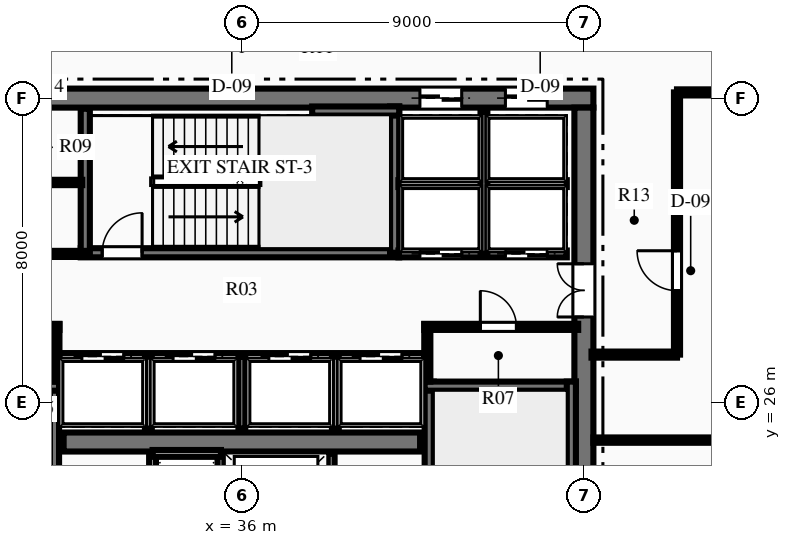
"""IFC4 building model, lengths in metres.
Left out: names, types, materials, properties, quantities, classifications, styles, units other than length and angle.
Written with IfcOpenShell. Run it as: python <this file> out.ifc"""

import sys

from ifc_helpers import new_model, si_unit, direction, frame, frame_2d, origin, place, context, subcontext, project, spatial, rectangle, extrude, element, fill, save


model = new_model("IFC4")
c1 = context("Model", 3, precision=1e-05, world=origin(), true_north=direction((0.0, 1.0)))
c2 = subcontext(c1, "Body", "Model", "MODEL_VIEW")
j1 = project(units=[si_unit("LENGTHUNIT", "METRE"), si_unit("PLANEANGLEUNIT", "RADIAN")], contexts=[c1])
p1 = place(None, origin())
s1 = spatial("IfcSite", under=j1, at=p1, CompositionType="ELEMENT")
p2 = place(p1, origin())
s2 = spatial("IfcBuilding", under=s1, at=p2, CompositionType="ELEMENT")
p3 = place(p2, frame((0.0, 0.0, 213.45)))
s3 = spatial("IfcBuildingStorey", under=s2, at=p3, CompositionType="ELEMENT", Elevation=213.45)
p4 = place(p3, frame((26.75, 34.0, 0.0), z_axis=(0.0, 0.0, 1.0), x_axis=(1.0, 0.0, 0.0)))
e1 = element("IfcWall", 1, at=p4, inside=s3, PredefinedType="SHEAR", context=c2, shape_type="SweptSolid", body=[
    extrude(rectangle(XDim=18.5, YDim=0.5, at=frame_2d((9.25, 0.0))), origin(), (0.0, 0.0, 1.0), 3.75),
])
p5 = place(p4, frame((13.935, 0.0, 0.0)))
e2 = element("IfcOpeningElement", 2, at=p5, cuts=e1, PredefinedType="OPENING", context=c2, shape_type="SweptSolid", body=[
    extrude(rectangle(XDim=1.1, YDim=2.15, at=frame_2d((0.55, 1.075))), frame((0.0, 0.26, 0.0), z_axis=(0.0, -1.0, 0.0), x_axis=(1.0, 0.0, 0.0)), (0.0, 0.0, 1.0), 0.52),
])
p6 = place(p4, frame((16.185, 0.0, 0.0)))
e3 = element("IfcOpeningElement", 3, at=p6, cuts=e1, PredefinedType="OPENING", context=c2, shape_type="SweptSolid", body=[
    extrude(rectangle(XDim=1.1, YDim=2.15, at=frame_2d((0.55, 1.075))), frame((0.0, 0.26, 0.0), z_axis=(0.0, -1.0, 0.0), x_axis=(1.0, 0.0, 0.0)), (0.0, 0.0, 1.0), 0.52),
])
p7 = place(p3, frame((45.0, 18.25, 0.0), z_axis=(0.0, 0.0, 1.0), x_axis=(0.0, 1.0, 0.0)))
e4 = element("IfcWall", 4, at=p7, inside=s3, PredefinedType="SHEAR", context=c2, shape_type="SweptSolid", body=[
    extrude(rectangle(XDim=15.5, YDim=0.5, at=frame_2d((7.75, 0.0))), origin(), (0.0, 0.0, 1.0), 3.75),
])
p8 = place(p7, frame((9.99, 0.0, 0.0)))
e5 = element("IfcOpeningElement", 5, at=p8, cuts=e4, PredefinedType="OPENING", context=c2, shape_type="SweptSolid", body=[
    extrude(rectangle(XDim=1.4, YDim=2.2, at=frame_2d((0.7, 1.1))), frame((0.0, 0.26, 0.0), z_axis=(0.0, -1.0, 0.0), x_axis=(1.0, 0.0, 0.0)), (0.0, 0.0, 1.0), 0.52),
])
p9 = place(p3, frame((31.31, 24.95, 0.0), z_axis=(0.0, 0.0, 1.0), x_axis=(1.0, 0.0, 0.0)))
e6 = element("IfcWall", 6, at=p9, inside=s3, PredefinedType="SHEAR", context=c2, shape_type="SweptSolid", body=[
    extrude(rectangle(XDim=9.38, YDim=0.5, at=frame_2d((4.69, 0.0))), origin(), (0.0, 0.0, 1.0), 3.75),
])
p10 = place(p3, frame((31.07, 18.28, 0.0), z_axis=(0.0, 0.0, 1.0), x_axis=(0.0, 1.0, 0.0)))
e7 = element("IfcWall", 7, at=p10, inside=s3, PredefinedType="SHEAR", context=c2, shape_type="SweptSolid", body=[
    extrude(rectangle(XDim=8.26, YDim=0.24, at=frame_2d((4.13, 0.0))), origin(), (0.0, 0.0, 1.0), 3.75),
])
p11 = place(p10, frame((0.365, 0.0, 0.0)))
e8 = element("IfcOpeningElement", 8, at=p11, cuts=e7, PredefinedType="OPENING", context=c2, shape_type="SweptSolid", body=[
    extrude(rectangle(XDim=1.05, YDim=2.15, at=frame_2d((0.525, 1.075))), frame((0.0, 0.13, 0.0), z_axis=(0.0, -1.0, 0.0), x_axis=(1.0, 0.0, 0.0)), (0.0, 0.0, 1.0), 0.26),
])
p12 = place(p3, frame((27.21, 26.42, 0.0), z_axis=(0.0, 0.0, 1.0), x_axis=(1.0, 0.0, 0.0)))
e9 = element("IfcWall", 9, at=p12, inside=s3, PredefinedType="SHEAR", context=c2, shape_type="SweptSolid", body=[
    extrude(rectangle(XDim=3.98, YDim=0.24, at=frame_2d((1.99, 0.0))), origin(), (0.0, 0.0, 1.0), 3.75),
])
p13 = place(p3, frame((40.93, 18.28, 0.0), z_axis=(0.0, 0.0, 1.0), x_axis=(0.0, 1.0, 0.0)))
e10 = element("IfcWall", 10, at=p13, inside=s3, PredefinedType="SHEAR", context=c2, shape_type="SweptSolid", body=[
    extrude(rectangle(XDim=8.26, YDim=0.24, at=frame_2d((4.13, 0.0))), origin(), (0.0, 0.0, 1.0), 3.75),
])
p14 = place(p13, frame((0.365, 0.0, 0.0)))
e11 = element("IfcOpeningElement", 11, at=p14, cuts=e10, PredefinedType="OPENING", context=c2, shape_type="SweptSolid", body=[
    extrude(rectangle(XDim=1.05, YDim=2.15, at=frame_2d((0.525, 1.075))), frame((0.0, 0.13, 0.0), z_axis=(0.0, -1.0, 0.0), x_axis=(1.0, 0.0, 0.0)), (0.0, 0.0, 1.0), 0.26),
])
p15 = place(p3, frame((40.81, 26.42, 0.0), z_axis=(0.0, 0.0, 1.0), x_axis=(1.0, 0.0, 0.0)))
e12 = element("IfcWall", 12, at=p15, inside=s3, PredefinedType="SHEAR", context=c2, shape_type="SweptSolid", body=[
    extrude(rectangle(XDim=3.98, YDim=0.24, at=frame_2d((1.99, 0.0))), origin(), (0.0, 0.0, 1.0), 3.75),
])
p16 = place(p3, frame((44.67, 18.28, 0.0), z_axis=(0.0, 0.0, 1.0), x_axis=(0.0, 1.0, 0.0)))
e13 = element("IfcWall", 13, at=p16, inside=s3, PredefinedType="SHEAR", context=c2, shape_type="SweptSolid", body=[
    extrude(rectangle(XDim=8.26, YDim=0.24, at=frame_2d((4.13, 0.0))), origin(), (0.0, 0.0, 1.0), 3.75),
])
p17 = place(p3, frame((31.76, 29.93, 0.0), z_axis=(0.0, 0.0, 1.0), x_axis=(1.0, 0.0, 0.0)))
e14 = element("IfcWall", 14, at=p17, inside=s3, PredefinedType="SHEAR", context=c2, shape_type="SweptSolid", body=[
    extrude(rectangle(XDim=8.38, YDim=0.24, at=frame_2d((4.19, 0.0))), origin(), (0.0, 0.0, 1.0), 3.75),
])
p18 = place(p17, frame((0.565, 0.0, 0.0)))
e15 = element("IfcOpeningElement", 15, at=p18, cuts=e14, PredefinedType="OPENING", context=c2, shape_type="SweptSolid", body=[
    extrude(rectangle(XDim=1.05, YDim=2.15, at=frame_2d((0.525, 1.075))), frame((0.0, 0.13, 0.0), z_axis=(0.0, -1.0, 0.0), x_axis=(1.0, 0.0, 0.0)), (0.0, 0.0, 1.0), 0.26),
])
p19 = place(p3, frame((31.88, 29.93, 0.0), z_axis=(0.0, 0.0, 1.0), x_axis=(0.0, 1.0, 0.0)))
e16 = element("IfcWall", 16, at=p19, inside=s3, PredefinedType="SHEAR", context=c2, shape_type="SweptSolid", body=[
    extrude(rectangle(XDim=3.79, YDim=0.24, at=frame_2d((1.895, 0.0))), origin(), (0.0, 0.0, 1.0), 3.75),
])
p20 = place(p3, frame((40.02, 29.93, 0.0), z_axis=(0.0, 0.0, 1.0), x_axis=(0.0, 1.0, 0.0)))
e17 = element("IfcWall", 17, at=p20, inside=s3, PredefinedType="SHEAR", context=c2, shape_type="SweptSolid", body=[
    extrude(rectangle(XDim=3.85, YDim=0.24, at=frame_2d((1.925, 0.0))), origin(), (0.0, 0.0, 1.0), 3.75),
])
p21 = place(p3, frame((37.85, 33.66, 0.0), z_axis=(0.0, 0.0, 1.0), x_axis=(1.0, 0.0, 0.0)))
e18 = element("IfcWall", 18, at=p21, inside=s3, PredefinedType="SHEAR", context=c2, shape_type="SweptSolid", body=[
    extrude(rectangle(XDim=2.29, YDim=0.24, at=frame_2d((1.145, 0.0))), origin(), (0.0, 0.0, 1.0), 3.75),
])
for number, where, z_axis, x_axis in (
    (19, (33.65, 22.05, 0.0), (0.0, 0.0, 1.0), (0.0, 1.0, 0.0)),
    (20, (35.45, 22.05, 0.0), (0.0, 0.0, 1.0), (0.0, 1.0, 0.0)),
):
    element("IfcWall", number, at=place(p3, frame(where, z_axis=z_axis, x_axis=x_axis)), inside=s3, PredefinedType="PARTITIONING", context=c2, shape_type="SweptSolid", body=[
        extrude(rectangle(XDim=2.6, YDim=0.18, at=frame_2d((1.3, 0.0))), origin(), (0.0, 0.0, 1.0), 3.47),
    ])
p22 = place(p3, frame((33.65, 24.65, 0.0), z_axis=(0.0, 0.0, 1.0), x_axis=(1.0, 0.0, 0.0)))
e21 = element("IfcWall", 21, at=p22, inside=s3, PredefinedType="PARTITIONING", context=c2, shape_type="SweptSolid", body=[
    extrude(rectangle(XDim=1.8, YDim=0.18, at=frame_2d((0.9, 0.0))), origin(), (0.0, 0.0, 1.0), 3.47),
])
p23 = place(p3, frame((38.35, 22.05, 0.0), z_axis=(0.0, 0.0, 1.0), x_axis=(0.0, 1.0, 0.0)))
e22 = element("IfcWall", 22, at=p23, inside=s3, PredefinedType="PARTITIONING", context=c2, shape_type="SweptSolid", body=[
    extrude(rectangle(XDim=2.6, YDim=0.18, at=frame_2d((1.3, 0.0))), origin(), (0.0, 0.0, 1.0), 3.47),
])
p24 = place(p3, frame((27.15, 27.98, 0.0), z_axis=(0.0, 0.0, 1.0), x_axis=(1.0, 0.0, 0.0)))
e23 = element("IfcWall", 23, at=p24, inside=s3, PredefinedType="PARTITIONING", context=c2, shape_type="SweptSolid", body=[
    extrude(rectangle(XDim=4.05, YDim=0.16, at=frame_2d((2.025, 0.0))), origin(), (0.0, 0.0, 1.0), 3.47),
])
p25 = place(p24, frame((0.36, 0.0, 0.0)))
e24 = element("IfcOpeningElement", 24, at=p25, cuts=e23, PredefinedType="OPENING", context=c2, shape_type="SweptSolid", body=[
    extrude(rectangle(XDim=0.9, YDim=2.15, at=frame_2d((0.45, 1.075))), frame((0.0, 0.09, 0.0), z_axis=(0.0, -1.0, 0.0), x_axis=(1.0, 0.0, 0.0)), (0.0, 0.0, 1.0), 0.18),
])
p26 = place(p24, frame((1.63, 0.0, 0.0)))
e25 = element("IfcOpeningElement", 25, at=p26, cuts=e23, PredefinedType="OPENING", context=c2, shape_type="SweptSolid", body=[
    extrude(rectangle(XDim=0.9, YDim=2.15, at=frame_2d((0.45, 1.075))), frame((0.0, 0.09, 0.0), z_axis=(0.0, -1.0, 0.0), x_axis=(1.0, 0.0, 0.0)), (0.0, 0.0, 1.0), 0.18),
])
p27 = place(p24, frame((2.788, 0.0, 0.0)))
e26 = element("IfcOpeningElement", 26, at=p27, cuts=e23, PredefinedType="OPENING", context=c2, shape_type="SweptSolid", body=[
    extrude(rectangle(XDim=0.9, YDim=2.15, at=frame_2d((0.45, 1.075))), frame((0.0, 0.09, 0.0), z_axis=(0.0, -1.0, 0.0), x_axis=(1.0, 0.0, 0.0)), (0.0, 0.0, 1.0), 0.18),
])
p28 = place(p3, frame((31.12, 26.54, 0.0), z_axis=(0.0, 0.0, 1.0), x_axis=(0.0, 1.0, 0.0)))
e27 = element("IfcWall", 27, at=p28, inside=s3, PredefinedType="PARTITIONING", context=c2, shape_type="SweptSolid", body=[
    extrude(rectangle(XDim=1.51, YDim=0.16, at=frame_2d((0.755, 0.0))), origin(), (0.0, 0.0, 1.0), 3.47),
])
p29 = place(p3, frame((40.8, 27.98, 0.0), z_axis=(0.0, 0.0, 1.0), x_axis=(1.0, 0.0, 0.0)))
e28 = element("IfcWall", 28, at=p29, inside=s3, PredefinedType="PARTITIONING", context=c2, shape_type="SweptSolid", body=[
    extrude(rectangle(XDim=4.05, YDim=0.16, at=frame_2d((2.025, 0.0))), origin(), (0.0, 0.0, 1.0), 3.47),
])
p30 = place(p29, frame((1.475, 0.0, 0.0)))
e29 = element("IfcOpeningElement", 29, at=p30, cuts=e28, PredefinedType="OPENING", context=c2, shape_type="SweptSolid", body=[
    extrude(rectangle(XDim=0.95, YDim=2.15, at=frame_2d((0.475, 1.075))), frame((0.0, 0.09, 0.0), z_axis=(0.0, -1.0, 0.0), x_axis=(1.0, 0.0, 0.0)), (0.0, 0.0, 1.0), 0.18),
])
p31 = place(p3, frame((40.88, 26.54, 0.0), z_axis=(0.0, 0.0, 1.0), x_axis=(0.0, 1.0, 0.0)))
e30 = element("IfcWall", 30, at=p31, inside=s3, PredefinedType="PARTITIONING", context=c2, shape_type="SweptSolid", body=[
    extrude(rectangle(XDim=1.51, YDim=0.16, at=frame_2d((0.755, 0.0))), origin(), (0.0, 0.0, 1.0), 3.47),
])
p32 = place(p3, frame((27.45, 29.9, 0.0), z_axis=(0.0, 0.0, 1.0), x_axis=(1.0, 0.0, 0.0)))
e31 = element("IfcWall", 31, at=p32, inside=s3, PredefinedType="PARTITIONING", context=c2, shape_type="SweptSolid", body=[
    extrude(rectangle(XDim=4.43, YDim=0.16, at=frame_2d((2.215, 0.0))), origin(), (0.0, 0.0, 1.0), 3.47),
])
p33 = place(p32, frame((1.675, 0.0, 0.0)))
e32 = element("IfcOpeningElement", 32, at=p33, cuts=e31, PredefinedType="OPENING", context=c2, shape_type="SweptSolid", body=[
    extrude(rectangle(XDim=0.95, YDim=2.15, at=frame_2d((0.475, 1.075))), frame((0.0, 0.09, 0.0), z_axis=(0.0, -1.0, 0.0), x_axis=(1.0, 0.0, 0.0)), (0.0, 0.0, 1.0), 0.18),
])
p34 = place(p3, frame((27.45, 31.78, 0.0), z_axis=(0.0, 0.0, 1.0), x_axis=(1.0, 0.0, 0.0)))
e33 = element("IfcWall", 33, at=p34, inside=s3, PredefinedType="PARTITIONING", context=c2, shape_type="SweptSolid", body=[
    extrude(rectangle(XDim=4.35, YDim=0.14, at=frame_2d((2.175, 0.0))), origin(), (0.0, 0.0, 1.0), 3.47),
])
p35 = place(p34, frame((1.7, 0.0, 0.0)))
e34 = element("IfcOpeningElement", 34, at=p35, cuts=e33, PredefinedType="OPENING", context=c2, shape_type="SweptSolid", body=[
    extrude(rectangle(XDim=0.9, YDim=2.15, at=frame_2d((0.45, 1.075))), frame((0.0, 0.08, 0.0), z_axis=(0.0, -1.0, 0.0), x_axis=(1.0, 0.0, 0.0)), (0.0, 0.0, 1.0), 0.16),
])
p36 = place(p3, frame((40.12, 29.9, 0.0), z_axis=(0.0, 0.0, 1.0), x_axis=(1.0, 0.0, 0.0)))
e35 = element("IfcWall", 35, at=p36, inside=s3, PredefinedType="PARTITIONING", context=c2, shape_type="SweptSolid", body=[
    extrude(rectangle(XDim=4.43, YDim=0.18, at=frame_2d((2.215, 0.0))), origin(), (0.0, 0.0, 1.0), 3.47),
])
p37 = place(p36, frame((0.565, 0.0, 0.0)))
e36 = element("IfcOpeningElement", 36, at=p37, cuts=e35, PredefinedType="OPENING", context=c2, shape_type="SweptSolid", body=[
    extrude(rectangle(XDim=1.1, YDim=2.15, at=frame_2d((0.55, 1.075))), frame((0.0, 0.1, 0.0), z_axis=(0.0, -1.0, 0.0), x_axis=(1.0, 0.0, 0.0)), (0.0, 0.0, 1.0), 0.2),
])
p38 = place(p36, frame((2.815, 0.0, 0.0)))
e37 = element("IfcOpeningElement", 37, at=p38, cuts=e35, PredefinedType="OPENING", context=c2, shape_type="SweptSolid", body=[
    extrude(rectangle(XDim=1.1, YDim=2.15, at=frame_2d((0.55, 1.075))), frame((0.0, 0.1, 0.0), z_axis=(0.0, -1.0, 0.0), x_axis=(1.0, 0.0, 0.0)), (0.0, 0.0, 1.0), 0.2),
])
p39 = place(p3, frame((40.12, 31.75, 0.0), z_axis=(0.0, 0.0, 1.0), x_axis=(1.0, 0.0, 0.0)))
e38 = element("IfcWall", 38, at=p39, inside=s3, PredefinedType="PARTITIONING", context=c2, shape_type="SweptSolid", body=[
    extrude(rectangle(XDim=4.43, YDim=0.18, at=frame_2d((2.215, 0.0))), origin(), (0.0, 0.0, 1.0), 3.47),
])
p40 = place(p3, frame((42.37, 29.9, 0.0), z_axis=(0.0, 0.0, 1.0), x_axis=(0.0, 1.0, 0.0)))
e39 = element("IfcWall", 39, at=p40, inside=s3, PredefinedType="PARTITIONING", context=c2, shape_type="SweptSolid", body=[
    extrude(rectangle(XDim=3.75, YDim=0.18, at=frame_2d((1.875, 0.0))), origin(), (0.0, 0.0, 1.0), 3.47),
])
p41 = place(p3, frame((31.2, 27.2, 0.0), z_axis=(0.0, 0.0, 1.0), x_axis=(1.0, 0.0, 0.0)))
e40 = element("IfcWall", 40, at=p41, inside=s3, PredefinedType="PARTITIONING", context=c2, shape_type="SweptSolid", body=[
    extrude(rectangle(XDim=9.6, YDim=0.18, at=frame_2d((4.8, 0.0))), origin(), (0.0, 0.0, 1.0), 3.47),
])
p42 = place(p41, frame((0.59, 0.0, 0.0)))
e41 = element("IfcOpeningElement", 41, at=p42, cuts=e40, PredefinedType="OPENING", context=c2, shape_type="SweptSolid", body=[
    extrude(rectangle(XDim=1.1, YDim=2.15, at=frame_2d((0.55, 1.075))), frame((0.0, 0.1, 0.0), z_axis=(0.0, -1.0, 0.0), x_axis=(1.0, 0.0, 0.0)), (0.0, 0.0, 1.0), 0.2),
])
p43 = place(p41, frame((2.99, 0.0, 0.0)))
e42 = element("IfcOpeningElement", 42, at=p43, cuts=e40, PredefinedType="OPENING", context=c2, shape_type="SweptSolid", body=[
    extrude(rectangle(XDim=1.1, YDim=2.15, at=frame_2d((0.55, 1.075))), frame((0.0, 0.1, 0.0), z_axis=(0.0, -1.0, 0.0), x_axis=(1.0, 0.0, 0.0)), (0.0, 0.0, 1.0), 0.2),
])
p44 = place(p41, frame((5.51, 0.0, 0.0)))
e43 = element("IfcOpeningElement", 43, at=p44, cuts=e40, PredefinedType="OPENING", context=c2, shape_type="SweptSolid", body=[
    extrude(rectangle(XDim=1.1, YDim=2.15, at=frame_2d((0.55, 1.075))), frame((0.0, 0.1, 0.0), z_axis=(0.0, -1.0, 0.0), x_axis=(1.0, 0.0, 0.0)), (0.0, 0.0, 1.0), 0.2),
])
p45 = place(p41, frame((7.91, 0.0, 0.0)))
e44 = element("IfcOpeningElement", 44, at=p45, cuts=e40, PredefinedType="OPENING", context=c2, shape_type="SweptSolid", body=[
    extrude(rectangle(XDim=1.1, YDim=2.15, at=frame_2d((0.55, 1.075))), frame((0.0, 0.1, 0.0), z_axis=(0.0, -1.0, 0.0), x_axis=(1.0, 0.0, 0.0)), (0.0, 0.0, 1.0), 0.2),
])
for number, where, z_axis, x_axis in (
    (45, (33.54, 25.3, 0.0), (0.0, 0.0, 1.0), (0.0, 1.0, 0.0)),
    (46, (36.0, 25.3, 0.0), (0.0, 0.0, 1.0), (0.0, 1.0, 0.0)),
    (47, (38.46, 25.3, 0.0), (0.0, 0.0, 1.0), (0.0, 1.0, 0.0)),
):
    element("IfcWall", number, at=place(p3, frame(where, z_axis=z_axis, x_axis=x_axis)), inside=s3, PredefinedType="PARTITIONING", context=c2, shape_type="SweptSolid", body=[
        extrude(rectangle(XDim=1.9, YDim=0.18, at=frame_2d((0.95, 0.0))), origin(), (0.0, 0.0, 1.0), 3.47),
    ])
p46 = place(p3, frame((47.45, 34.15, 0.0), z_axis=(0.0, 0.0, 1.0), x_axis=(1.0, 0.0, 0.0)))
e48 = element("IfcWall", 48, at=p46, inside=s3, PredefinedType="PARTITIONING", context=c2, shape_type="SweptSolid", body=[
    extrude(rectangle(XDim=6.35, YDim=0.16, at=frame_2d((3.175, 0.0))), origin(), (0.0, 0.0, 1.0), 3.47),
])
p47 = place(p3, frame((47.45, 27.25, 0.0), z_axis=(0.0, 0.0, 1.0), x_axis=(0.0, 1.0, 0.0)))
e49 = element("IfcWall", 49, at=p47, inside=s3, PredefinedType="PARTITIONING", context=c2, shape_type="SweptSolid", body=[
    extrude(rectangle(XDim=6.9, YDim=0.16, at=frame_2d((3.45, 0.0))), origin(), (0.0, 0.0, 1.0), 3.47),
])
p48 = place(p47, frame((1.683, 0.0, 0.0)))
e50 = element("IfcOpeningElement", 50, at=p48, cuts=e49, PredefinedType="OPENING", context=c2, shape_type="SweptSolid", body=[
    extrude(rectangle(XDim=1.05, YDim=2.15, at=frame_2d((0.525, 1.075))), frame((0.0, 0.09, 0.0), z_axis=(0.0, -1.0, 0.0), x_axis=(1.0, 0.0, 0.0)), (0.0, 0.0, 1.0), 0.18),
])
p49 = place(p3, frame((45.2, 27.25, 0.0), z_axis=(0.0, 0.0, 1.0), x_axis=(1.0, 0.0, 0.0)))
e51 = element("IfcWall", 51, at=p49, inside=s3, PredefinedType="PARTITIONING", context=c2, shape_type="SweptSolid", body=[
    extrude(rectangle(XDim=2.25, YDim=0.16, at=frame_2d((1.125, 0.0))), origin(), (0.0, 0.0, 1.0), 3.47),
])
p50 = place(p3, frame((45.25, 25.0, 0.0), z_axis=(0.0, 0.0, 1.0), x_axis=(1.0, 0.0, 0.0)))
e52 = element("IfcWall", 52, at=p50, inside=s3, PredefinedType="PARTITIONING", context=c2, shape_type="SweptSolid", body=[
    extrude(rectangle(XDim=18.625, YDim=0.14, at=frame_2d((9.312, 0.0))), origin(), (0.0, 0.0, 1.0), 2.849),
])
p51 = place(p30, origin())
e53 = element("IfcDoor", 53, at=p51, inside=s3, OperationType="SINGLE_SWING_LEFT", PredefinedType="DOOR", context=c2, shape_type="SweptSolid", body=[
    extrude(rectangle(XDim=0.95, YDim=2.15, at=frame_2d((0.475, 1.075))), frame((0.0, 0.025, 0.0), z_axis=(0.0, -1.0, 0.0), x_axis=(1.0, 0.0, 0.0)), (0.0, 0.0, 1.0), 0.05),
])
fill(e29, e53)
p52 = place(p18, origin())
e54 = element("IfcDoor", 54, at=p52, inside=s3, OperationType="SINGLE_SWING_RIGHT", PredefinedType="DOOR", context=c2, shape_type="SweptSolid", body=[
    extrude(rectangle(XDim=1.05, YDim=2.15, at=frame_2d((0.525, 1.075))), frame((0.0, 0.025, 0.0), z_axis=(0.0, -1.0, 0.0), x_axis=(1.0, 0.0, 0.0)), (0.0, 0.0, 1.0), 0.05),
])
fill(e15, e54)
p53 = place(p8, origin())
e55 = element("IfcDoor", 55, at=p53, inside=s3, OperationType="DOUBLE_DOOR_SINGLE_SWING", PredefinedType="DOOR", context=c2, shape_type="SweptSolid", body=[
    extrude(rectangle(XDim=1.4, YDim=2.2, at=frame_2d((0.7, 1.1))), frame((0.0, 0.025, 0.0), z_axis=(0.0, -1.0, 0.0), x_axis=(1.0, 0.0, 0.0)), (0.0, 0.0, 1.0), 0.05),
])
fill(e5, e55)
p54 = place(p48, origin())
e56 = element("IfcDoor", 56, at=p54, inside=s3, OperationType="SINGLE_SWING_RIGHT", PredefinedType="DOOR", context=c2, shape_type="SweptSolid", body=[
    extrude(rectangle(XDim=1.05, YDim=2.15, at=frame_2d((0.525, 1.075))), frame((0.0, 0.025, 0.0), z_axis=(0.0, -1.0, 0.0), x_axis=(1.0, 0.0, 0.0)), (0.0, 0.0, 1.0), 0.05),
])
fill(e50, e56)
p55 = place(p37, origin())
e57 = element("IfcDoor", 57, at=p55, inside=s3, OperationType="SLIDING_TO_LEFT", PredefinedType="DOOR", context=c2, shape_type="SweptSolid", body=[
    extrude(rectangle(XDim=1.1, YDim=2.15, at=frame_2d((0.55, 1.075))), frame((0.0, 0.025, 0.0), z_axis=(0.0, -1.0, 0.0), x_axis=(1.0, 0.0, 0.0)), (0.0, 0.0, 1.0), 0.05),
])
fill(e36, e57)
p56 = place(p38, origin())
e58 = element("IfcDoor", 58, at=p56, inside=s3, OperationType="SLIDING_TO_LEFT", PredefinedType="DOOR", context=c2, shape_type="SweptSolid", body=[
    extrude(rectangle(XDim=1.1, YDim=2.15, at=frame_2d((0.55, 1.075))), frame((0.0, 0.025, 0.0), z_axis=(0.0, -1.0, 0.0), x_axis=(1.0, 0.0, 0.0)), (0.0, 0.0, 1.0), 0.05),
])
fill(e37, e58)
p57 = place(p5, origin())
e59 = element("IfcDoor", 59, at=p57, inside=s3, OperationType="SLIDING_TO_LEFT", PredefinedType="DOOR", context=c2, shape_type="SweptSolid", body=[
    extrude(rectangle(XDim=1.1, YDim=2.15, at=frame_2d((0.55, 1.075))), frame((0.0, 0.025, 0.0), z_axis=(0.0, -1.0, 0.0), x_axis=(1.0, 0.0, 0.0)), (0.0, 0.0, 1.0), 0.05),
])
fill(e2, e59)
p58 = place(p6, origin())
e60 = element("IfcDoor", 60, at=p58, inside=s3, OperationType="SLIDING_TO_LEFT", PredefinedType="DOOR", context=c2, shape_type="SweptSolid", body=[
    extrude(rectangle(XDim=1.1, YDim=2.15, at=frame_2d((0.55, 1.075))), frame((0.0, 0.025, 0.0), z_axis=(0.0, -1.0, 0.0), x_axis=(1.0, 0.0, 0.0)), (0.0, 0.0, 1.0), 0.05),
])
fill(e3, e60)
p59 = place(p42, origin())
e61 = element("IfcDoor", 61, at=p59, inside=s3, OperationType="SLIDING_TO_LEFT", PredefinedType="DOOR", context=c2, shape_type="SweptSolid", body=[
    extrude(rectangle(XDim=1.1, YDim=2.15, at=frame_2d((0.55, 1.075))), frame((0.0, 0.025, 0.0), z_axis=(0.0, -1.0, 0.0), x_axis=(1.0, 0.0, 0.0)), (0.0, 0.0, 1.0), 0.05),
])
fill(e41, e61)
p60 = place(p43, origin())
e62 = element("IfcDoor", 62, at=p60, inside=s3, OperationType="SLIDING_TO_LEFT", PredefinedType="DOOR", context=c2, shape_type="SweptSolid", body=[
    extrude(rectangle(XDim=1.1, YDim=2.15, at=frame_2d((0.55, 1.075))), frame((0.0, 0.025, 0.0), z_axis=(0.0, -1.0, 0.0), x_axis=(1.0, 0.0, 0.0)), (0.0, 0.0, 1.0), 0.05),
])
fill(e42, e62)
p61 = place(p44, origin())
e63 = element("IfcDoor", 63, at=p61, inside=s3, OperationType="SLIDING_TO_LEFT", PredefinedType="DOOR", context=c2, shape_type="SweptSolid", body=[
    extrude(rectangle(XDim=1.1, YDim=2.15, at=frame_2d((0.55, 1.075))), frame((0.0, 0.025, 0.0), z_axis=(0.0, -1.0, 0.0), x_axis=(1.0, 0.0, 0.0)), (0.0, 0.0, 1.0), 0.05),
])
fill(e43, e63)
p62 = place(p45, origin())
e64 = element("IfcDoor", 64, at=p62, inside=s3, OperationType="SLIDING_TO_LEFT", PredefinedType="DOOR", context=c2, shape_type="SweptSolid", body=[
    extrude(rectangle(XDim=1.1, YDim=2.15, at=frame_2d((0.55, 1.075))), frame((0.0, 0.025, 0.0), z_axis=(0.0, -1.0, 0.0), x_axis=(1.0, 0.0, 0.0)), (0.0, 0.0, 1.0), 0.05),
])
fill(e44, e64)
save(model, sys.argv[1])
